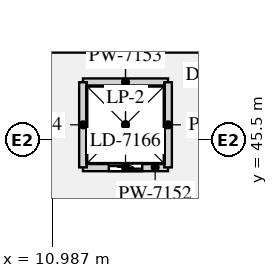
"""IFC4 building model, lengths in metres.
Left out: names, types, materials, properties, quantities, classifications, styles, units other than length and angle.
Written with IfcOpenShell. Run it as: python <this file> out.ifc"""

import sys

from ifc_helpers import new_model, si_unit, direction, frame, frame_2d, origin, place, context, subcontext, project, spatial, rectangle, extrude, element, fill, save


model = new_model("IFC4")
c1 = context("Model", 3, precision=1e-05, world=origin(), true_north=direction((0.0, 1.0)))
c2 = subcontext(c1, "Body", "Model", "MODEL_VIEW")
j1 = project(units=[si_unit("LENGTHUNIT", "METRE"), si_unit("PLANEANGLEUNIT", "RADIAN")], contexts=[c1])
p1 = place(None, origin())
s1 = spatial("IfcSite", under=j1, at=p1, CompositionType="ELEMENT")
p2 = place(p1, origin())
s2 = spatial("IfcBuilding", under=s1, at=p2, CompositionType="ELEMENT")
p3 = place(p2, origin())
s3 = spatial("IfcBuildingStorey", under=s2, at=p3, CompositionType="ELEMENT", Elevation=0.0)
p4 = place(p3, frame((12.0, 44.6, 0.0), z_axis=(0.0, 0.0, 1.0), x_axis=(1.0, 0.0, 0.0)))
e1 = element("IfcWall", 1, at=p4, inside=s3, PredefinedType="SOLIDWALL", context=c2, shape_type="SweptSolid", body=[
    extrude(rectangle(XDim=2.8, YDim=0.25, at=frame_2d((1.4, 0.0))), origin(), (0.0, 0.0, 1.0), 6.098),
])
p5 = place(p4, frame((0.85, 0.0, 0.0)))
e2 = element("IfcOpeningElement", 2, at=p5, cuts=e1, PredefinedType="OPENING", context=c2, shape_type="SweptSolid", body=[
    extrude(rectangle(XDim=1.1, YDim=2.1, at=frame_2d((0.55, 1.05))), frame((0.0, 0.135, 0.0), z_axis=(0.0, -1.0, 0.0), x_axis=(1.0, 0.0, 0.0)), (0.0, 0.0, 1.0), 0.27),
])
p6 = place(p3, frame((12.0, 47.4, 0.0), z_axis=(0.0, 0.0, 1.0), x_axis=(1.0, 0.0, 0.0)))
e3 = element("IfcWall", 3, at=p6, inside=s3, PredefinedType="SOLIDWALL", context=c2, shape_type="SweptSolid", body=[
    extrude(rectangle(XDim=2.8, YDim=0.25, at=frame_2d((1.4, 0.0))), origin(), (0.0, 0.0, 1.0), 6.098),
])
for number, where, z_axis, x_axis in (
    (4, (12.0, 44.6, 0.0), (0.0, 0.0, 1.0), (0.0, 1.0, 0.0)),
    (5, (14.8, 44.6, 0.0), (0.0, 0.0, 1.0), (0.0, 1.0, 0.0)),
):
    element("IfcWall", number, at=place(p3, frame(where, z_axis=z_axis, x_axis=x_axis)), inside=s3, PredefinedType="SOLIDWALL", context=c2, shape_type="SweptSolid", body=[
        extrude(rectangle(XDim=2.8, YDim=0.25, at=frame_2d((1.4, 0.0))), origin(), (0.0, 0.0, 1.0), 6.098),
    ])
p7 = place(p3, frame((9.0, 48.5, 0.0), z_axis=(0.0, 0.0, 1.0), x_axis=(1.0, 0.0, 0.0)))
e6 = element("IfcWall", 6, at=p7, inside=s3, PredefinedType="PARTITIONING", context=c2, shape_type="SweptSolid", body=[
    extrude(rectangle(XDim=9.0, YDim=0.25, at=frame_2d((4.5, 0.0))), origin(), (0.0, 0.0, 1.0), 6.098),
])
p8 = place(p7, frame((6.85, 0.0, 0.0)))
e7 = element("IfcOpeningElement", 7, at=p8, cuts=e6, PredefinedType="OPENING", context=c2, shape_type="SweptSolid", body=[
    extrude(rectangle(XDim=1.0, YDim=2.1, at=frame_2d((0.5, 1.05))), frame((0.0, 0.135, 0.0), z_axis=(0.0, -1.0, 0.0), x_axis=(1.0, 0.0, 0.0)), (0.0, 0.0, 1.0), 0.27),
])
p9 = place(p5, origin())
e8 = element("IfcDoor", 8, at=p9, inside=s3, OperationType="SLIDING_TO_LEFT", PredefinedType="DOOR", context=c2, shape_type="SweptSolid", body=[
    extrude(rectangle(XDim=1.1, YDim=2.1, at=frame_2d((0.55, 1.05))), frame((0.0, 0.025, 0.0), z_axis=(0.0, -1.0, 0.0), x_axis=(1.0, 0.0, 0.0)), (0.0, 0.0, 1.0), 0.05),
])
fill(e2, e8)
save(model, sys.argv[1])
